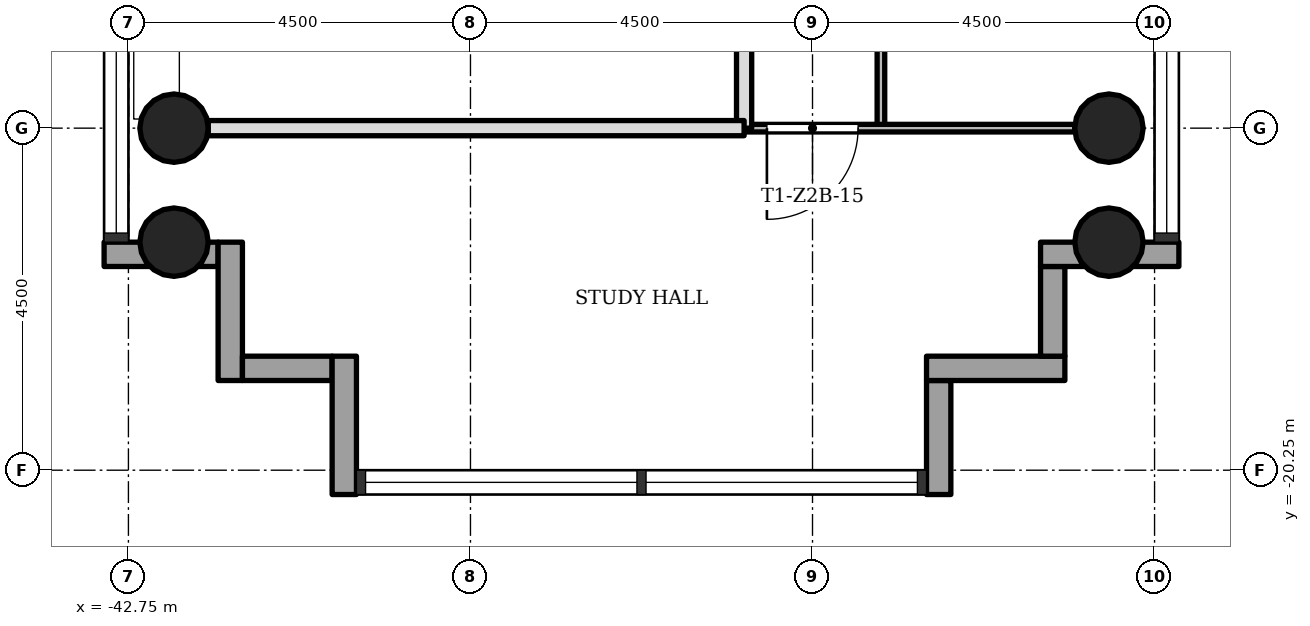
"""IFC4 building model, lengths in metres.
Left out: names, types, materials, properties, quantities, classifications, styles, units other than length and angle.
Written with IfcOpenShell. Run it as: python <this file> out.ifc"""

import sys

from ifc_helpers import new_model, si_unit, direction, frame, frame_2d, origin, origin_2d, place, context, subcontext, project, spatial, rectangle, hollow_circle, extrude, element, fill, save


model = new_model("IFC4")
c1 = context("Model", 3, precision=1e-05, world=origin(), true_north=direction((0.0, 1.0)))
c2 = subcontext(c1, "Body", "Model", "MODEL_VIEW")
j1 = project(units=[si_unit("LENGTHUNIT", "METRE"), si_unit("PLANEANGLEUNIT", "RADIAN")], contexts=[c1])
p1 = place(None, origin())
s1 = spatial("IfcSite", under=j1, at=p1, CompositionType="ELEMENT")
p2 = place(p1, origin())
s2 = spatial("IfcBuilding", under=s1, at=p2, CompositionType="ELEMENT")
p3 = place(p2, frame((0.0, 0.0, 83.4)))
s3 = spatial("IfcBuildingStorey", under=s2, at=p3, CompositionType="ELEMENT", Elevation=83.4)
for number, where, z_axis, x_axis in (
    (1, (-42.15, -15.75, 0.0), (0.0, 0.0, 1.0), (1.0, 0.0, 0.0)),
    (2, (-29.85, -15.75, 0.0), (0.0, 0.0, 1.0), (1.0, 0.0, 0.0)),
    (3, (-42.15, -17.25, 0.0), (0.0, 0.0, 1.0), (1.0, 0.0, 0.0)),
    (4, (-29.85, -17.25, 0.0), (0.0, 0.0, 1.0), (1.0, 0.0, 0.0)),
):
    element("IfcColumn", number, at=place(p3, frame(where, z_axis=z_axis, x_axis=x_axis)), inside=s3, PredefinedType="COLUMN", context=c2, shape_type="SweptSolid", body=[
        extrude(hollow_circle(Radius=0.45, WallThickness=0.032, at=origin_2d()), origin(), (0.0, 0.0, 1.0), 3.4),
    ])
p4 = place(p3, frame((-43.07, -17.41, -0.3), z_axis=(0.0, 0.0, 1.0), x_axis=(1.0, 0.0, 0.0)))
e5 = element("IfcWall", 5, at=p4, inside=s3, PredefinedType="STANDARD", context=c2, shape_type="SweptSolid", body=[
    extrude(rectangle(XDim=1.5, YDim=0.32, at=frame_2d((0.75, 0.0))), origin(), (0.0, 0.0, 1.0), 3.4),
])
p5 = place(p3, frame((-41.41, -17.25, -0.3), z_axis=(0.0, 0.0, 1.0), x_axis=(0.0, -1.0, 0.0)))
e6 = element("IfcWall", 6, at=p5, inside=s3, PredefinedType="STANDARD", context=c2, shape_type="SweptSolid", body=[
    extrude(rectangle(XDim=1.82, YDim=0.32, at=frame_2d((0.91, 0.0))), origin(), (0.0, 0.0, 1.0), 3.4),
])
p6 = place(p3, frame((-41.25, -18.91, -0.3), z_axis=(0.0, 0.0, 1.0), x_axis=(1.0, 0.0, 0.0)))
e7 = element("IfcWall", 7, at=p6, inside=s3, PredefinedType="STANDARD", context=c2, shape_type="SweptSolid", body=[
    extrude(rectangle(XDim=1.18, YDim=0.32, at=frame_2d((0.59, 0.0))), origin(), (0.0, 0.0, 1.0), 3.4),
])
p7 = place(p3, frame((-39.91, -18.75, -0.3), z_axis=(0.0, 0.0, 1.0), x_axis=(0.0, -1.0, 0.0)))
e8 = element("IfcWall", 8, at=p7, inside=s3, PredefinedType="STANDARD", context=c2, shape_type="SweptSolid", body=[
    extrude(rectangle(XDim=1.82, YDim=0.32, at=frame_2d((0.91, 0.0))), origin(), (0.0, 0.0, 1.0), 3.4),
])
p8 = place(p3, frame((-32.09, -20.57, -0.3), z_axis=(0.0, 0.0, 1.0), x_axis=(0.0, 1.0, 0.0)))
e9 = element("IfcWall", 9, at=p8, inside=s3, PredefinedType="STANDARD", context=c2, shape_type="SweptSolid", body=[
    extrude(rectangle(XDim=1.5, YDim=0.32, at=frame_2d((0.75, 0.0))), origin(), (0.0, 0.0, 1.0), 3.4),
])
p9 = place(p3, frame((-32.25, -18.91, -0.3), z_axis=(0.0, 0.0, 1.0), x_axis=(1.0, 0.0, 0.0)))
e10 = element("IfcWall", 10, at=p9, inside=s3, PredefinedType="STANDARD", context=c2, shape_type="SweptSolid", body=[
    extrude(rectangle(XDim=1.82, YDim=0.32, at=frame_2d((0.91, 0.0))), origin(), (0.0, 0.0, 1.0), 3.4),
])
p10 = place(p3, frame((-30.59, -18.75, -0.3), z_axis=(0.0, 0.0, 1.0), x_axis=(0.0, 1.0, 0.0)))
e11 = element("IfcWall", 11, at=p10, inside=s3, PredefinedType="STANDARD", context=c2, shape_type="SweptSolid", body=[
    extrude(rectangle(XDim=1.18, YDim=0.32, at=frame_2d((0.59, 0.0))), origin(), (0.0, 0.0, 1.0), 3.4),
])
p11 = place(p3, frame((-30.75, -17.41, -0.3), z_axis=(0.0, 0.0, 1.0), x_axis=(1.0, 0.0, 0.0)))
e12 = element("IfcWall", 12, at=p11, inside=s3, PredefinedType="STANDARD", context=c2, shape_type="SweptSolid", body=[
    extrude(rectangle(XDim=1.82, YDim=0.32, at=frame_2d((0.91, 0.0))), origin(), (0.0, 0.0, 1.0), 3.4),
])
p12 = place(p3, frame((-34.65, -15.75, 0.0), z_axis=(0.0, 0.0, 1.0), x_axis=(0.0, 1.0, 0.0)))
e13 = element("IfcWall", 13, at=p12, inside=s3, PredefinedType="SOLIDWALL", context=c2, shape_type="SweptSolid", body=[
    extrude(rectangle(XDim=7.2, YDim=0.2, at=frame_2d((3.6, 0.0))), origin(), (0.0, 0.0, 1.0), 3.0),
])
p13 = place(p12, frame((1.95, 0.0, 0.0)))
e14 = element("IfcOpeningElement", 14, at=p13, cuts=e13, PredefinedType="OPENING", context=c2, shape_type="SweptSolid", body=[
    extrude(rectangle(XDim=0.9, YDim=2.1, at=frame_2d((0.45, 1.05))), frame((0.0, 0.11, 0.0), z_axis=(0.0, -1.0, 0.0), x_axis=(1.0, 0.0, 0.0)), (0.0, 0.0, 1.0), 0.22),
])
p14 = place(p3, frame((-32.85, -15.75, 0.0), z_axis=(0.0, 0.0, 1.0), x_axis=(0.0, 1.0, 0.0)))
e15 = element("IfcWall", 15, at=p14, inside=s3, PredefinedType="PARTITIONING", context=c2, shape_type="SweptSolid", body=[
    extrude(rectangle(XDim=9.0, YDim=0.1, at=frame_2d((4.5, 0.0))), origin(), (0.0, 0.0, 1.0), 3.0),
])
p15 = place(p14, frame((5.55, 0.0, 0.0)))
e16 = element("IfcOpeningElement", 16, at=p15, cuts=e15, PredefinedType="OPENING", context=c2, shape_type="SweptSolid", body=[
    extrude(rectangle(XDim=0.9, YDim=2.1, at=frame_2d((0.45, 1.05))), frame((0.0, 0.06, 0.0), z_axis=(0.0, -1.0, 0.0), x_axis=(1.0, 0.0, 0.0)), (0.0, 0.0, 1.0), 0.12),
])
p16 = place(p3, frame((-34.65, -15.75, 0.0), z_axis=(0.0, 0.0, 1.0), x_axis=(1.0, 0.0, 0.0)))
e17 = element("IfcWall", 17, at=p16, inside=s3, PredefinedType="PARTITIONING", context=c2, shape_type="SweptSolid", body=[
    extrude(rectangle(XDim=4.35, YDim=0.1, at=frame_2d((2.175, 0.0))), origin(), (0.0, 0.0, 1.0), 3.0),
])
p17 = place(p16, frame((0.3, 0.0, 0.0)))
e18 = element("IfcOpeningElement", 18, at=p17, cuts=e17, PredefinedType="OPENING", context=c2, shape_type="SweptSolid", body=[
    extrude(rectangle(XDim=1.2, YDim=2.1, at=frame_2d((0.6, 1.05))), frame((0.0, 0.06, 0.0), z_axis=(0.0, -1.0, 0.0), x_axis=(1.0, 0.0, 0.0)), (0.0, 0.0, 1.0), 0.12),
])
p18 = place(p3, frame((-41.7, -15.75, 0.0), z_axis=(0.0, 0.0, 1.0), x_axis=(1.0, 0.0, 0.0)))
e19 = element("IfcWall", 19, at=p18, inside=s3, PredefinedType="SOLIDWALL", context=c2, shape_type="SweptSolid", body=[
    extrude(rectangle(XDim=7.05, YDim=0.2, at=frame_2d((3.525, 0.0))), origin(), (0.0, 0.0, 1.0), 3.0),
])
p19 = place(p17, origin())
e20 = element("IfcDoor", 20, at=p19, inside=s3, OperationType="SINGLE_SWING_LEFT", PredefinedType="DOOR", context=c2, shape_type="SweptSolid", body=[
    extrude(rectangle(XDim=1.2, YDim=2.1, at=frame_2d((0.6, 1.05))), frame((0.0, 0.025, 0.0), z_axis=(0.0, -1.0, 0.0), x_axis=(1.0, 0.0, 0.0)), (0.0, 0.0, 1.0), 0.05),
])
fill(e18, e20)
save(model, sys.argv[1])
